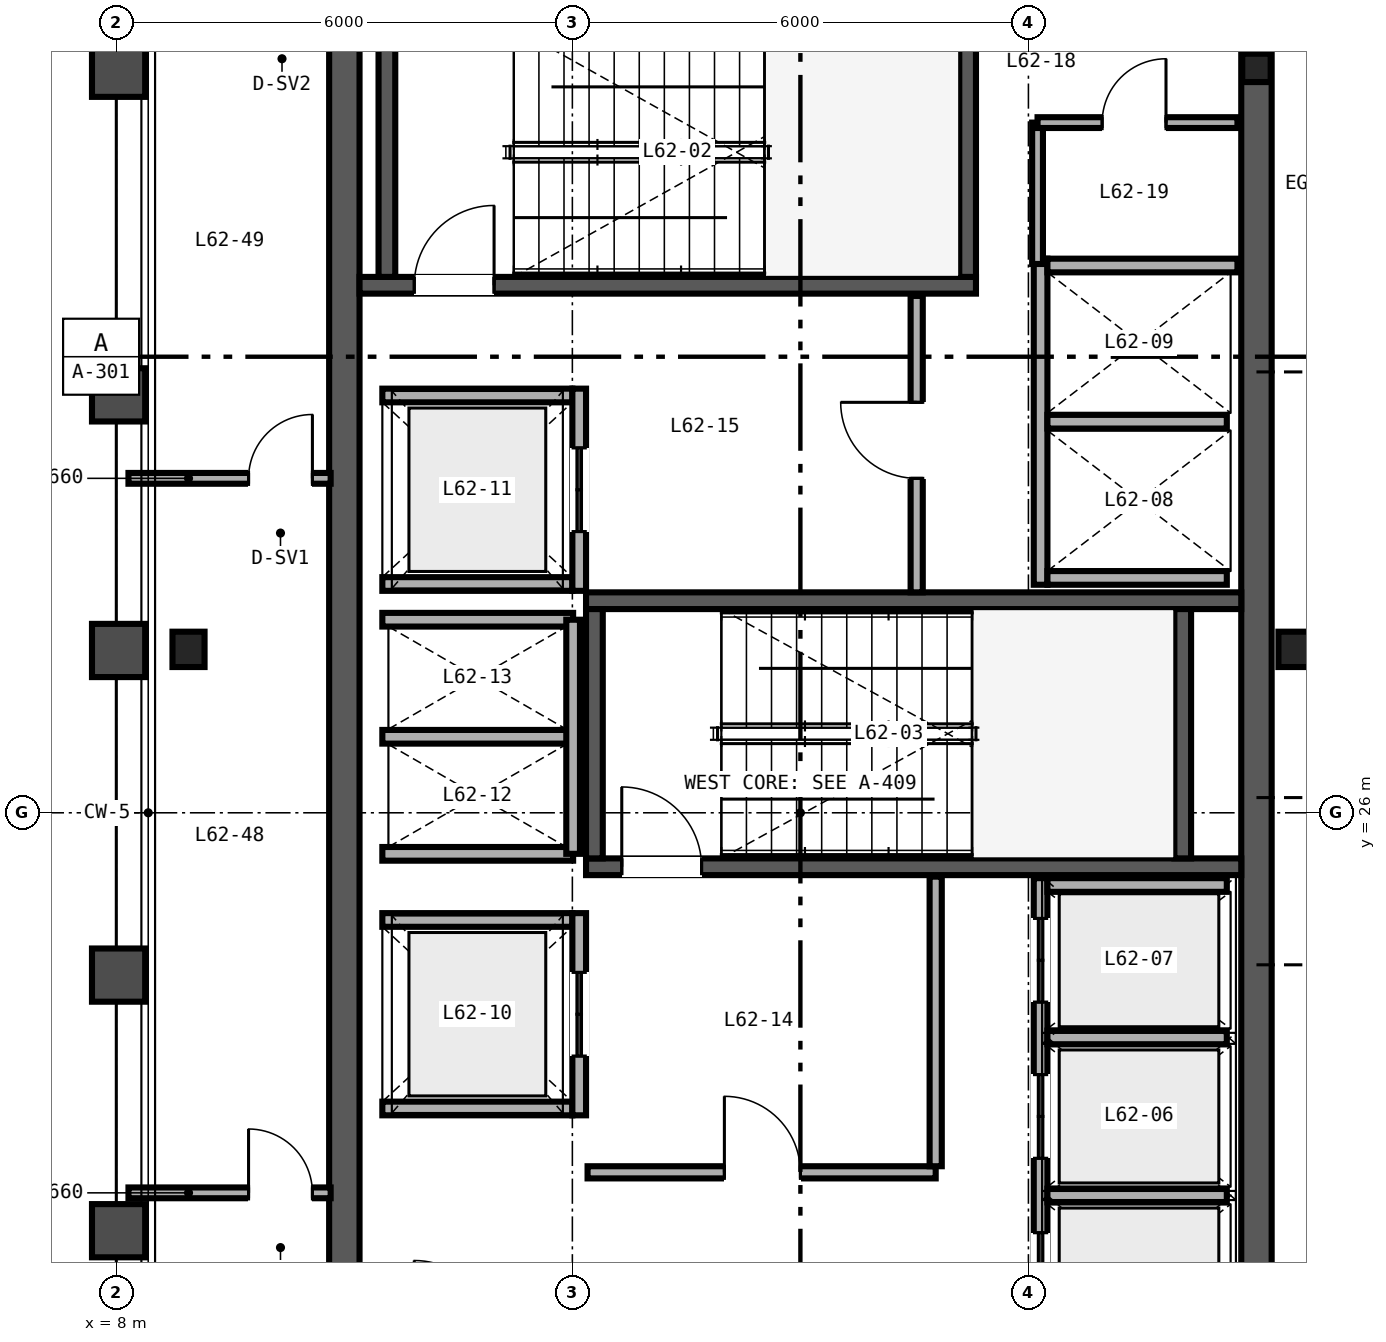
"""IFC4 building model, lengths in metres.
Left out: names, types, materials, properties, quantities, classifications, styles, units other than length and angle.
Written with IfcOpenShell. Run it as: python <this file> out.ifc"""

import sys

from ifc_helpers import new_model, si_unit, direction, frame, frame_2d, origin, origin_2d, place, context, subcontext, project, spatial, rectangle, i_section, extrude, source, transform, mapped, element, fill, save


model = new_model("IFC4")
c1 = context("Model", 3, precision=1e-05, world=origin(), true_north=direction((0.0, 1.0)))
c2 = subcontext(c1, "Body", "Model", "MODEL_VIEW")
j1 = project(units=[si_unit("LENGTHUNIT", "METRE"), si_unit("PLANEANGLEUNIT", "RADIAN")], contexts=[c1])
p1 = place(None, origin())
s1 = spatial("IfcSite", under=j1, at=p1, CompositionType="ELEMENT")
p2 = place(p1, origin())
s2 = spatial("IfcBuilding", under=s1, at=p2, CompositionType="ELEMENT")
p3 = place(p2, frame((0.0, 0.0, 247.2)))
s3 = spatial("IfcBuildingStorey", under=s2, at=p3, CompositionType="ELEMENT", Elevation=247.2)
m1 = source(origin(), c2, "Body", "SweptSolid", [
    extrude(i_section(OverallWidth=0.374, OverallDepth=0.373, WebThickness=0.016, FlangeThickness=0.026, FilletRadius=0.025, at=origin_2d()), origin(), (0.0, 0.0, 1.0), 3.6),
])
p4 = place(p3, frame((23.0, 35.8, 0.0), z_axis=(0.0, 0.0, 1.0), x_axis=(1.0, 0.0, 0.0)))
e1 = element("IfcColumn", 1, at=p4, inside=s3, PredefinedType="COLUMN", context=c2, shape_type="MappedRepresentation", body=[
    mapped(m1, transform((0.0, 0.0, 0.0), scale=1.0)),
])
for number, where, z_axis, x_axis in (
    (2, (11.0, 15.2, 0.0), (0.0, 0.0, 1.0), (0.0, 1.0, 0.0)),
    (3, (23.0, 15.2, 0.0), (0.0, 0.0, 1.0), (0.0, 1.0, 0.0)),
):
    element("IfcWall", number, at=place(p3, frame(where, z_axis=z_axis, x_axis=x_axis)), inside=s3, PredefinedType="SHEAR", context=c2, shape_type="SweptSolid", body=[
        extrude(rectangle(XDim=21.6, YDim=0.4, at=frame_2d((10.8, 0.0))), origin(), (0.0, 0.0, 1.0), 3.38),
    ])
p5 = place(p3, frame((11.2, 32.94, 0.0), z_axis=(0.0, 0.0, 1.0), x_axis=(1.0, 0.0, 0.0)))
e4 = element("IfcWall", 4, at=p5, inside=s3, PredefinedType="SHEAR", context=c2, shape_type="SweptSolid", body=[
    extrude(rectangle(XDim=8.11, YDim=0.22, at=frame_2d((4.055, 0.0))), origin(), (0.0, 0.0, 1.0), 3.4),
])
p6 = place(p5, frame((0.72, 0.0, 0.0)))
e5 = element("IfcOpeningElement", 5, at=p6, cuts=e4, PredefinedType="OPENING", context=c2, shape_type="SweptSolid", body=[
    extrude(rectangle(XDim=1.05, YDim=2.15, at=frame_2d((0.525, 1.075))), frame((0.0, 0.12, 0.0), z_axis=(0.0, -1.0, 0.0), x_axis=(1.0, 0.0, 0.0)), (0.0, 0.0, 1.0), 0.24),
])
for number, where, z_axis, x_axis in (
    (6, (11.56, 33.05, 0.0), (0.0, 0.0, 1.0), (0.0, 1.0, 0.0)),
    (7, (19.2, 33.05, 0.0), (0.0, 0.0, 1.0), (0.0, 1.0, 0.0)),
):
    element("IfcWall", number, at=place(p3, frame(where, z_axis=z_axis, x_axis=x_axis)), inside=s3, PredefinedType="SHEAR", context=c2, shape_type="SweptSolid", body=[
        extrude(rectangle(XDim=3.28, YDim=0.22, at=frame_2d((1.64, 0.0))), origin(), (0.0, 0.0, 1.0), 3.4),
    ])
p7 = place(p3, frame((14.18, 25.29, 0.0), z_axis=(0.0, 0.0, 1.0), x_axis=(1.0, 0.0, 0.0)))
e8 = element("IfcWall", 8, at=p7, inside=s3, PredefinedType="SHEAR", context=c2, shape_type="SweptSolid", body=[
    extrude(rectangle(XDim=8.62, YDim=0.22, at=frame_2d((4.31, 0.0))), origin(), (0.0, 0.0, 1.0), 3.4),
])
p8 = place(p7, frame((0.47, 0.0, 0.0)))
e9 = element("IfcOpeningElement", 9, at=p8, cuts=e8, PredefinedType="OPENING", context=c2, shape_type="SweptSolid", body=[
    extrude(rectangle(XDim=1.05, YDim=2.15, at=frame_2d((0.525, 1.075))), frame((0.0, 0.12, 0.0), z_axis=(0.0, -1.0, 0.0), x_axis=(1.0, 0.0, 0.0)), (0.0, 0.0, 1.0), 0.24),
])
p9 = place(p3, frame((14.18, 28.79, 0.0), z_axis=(0.0, 0.0, 1.0), x_axis=(1.0, 0.0, 0.0)))
e10 = element("IfcWall", 10, at=p9, inside=s3, PredefinedType="SHEAR", context=c2, shape_type="SweptSolid", body=[
    extrude(rectangle(XDim=8.62, YDim=0.22, at=frame_2d((4.31, 0.0))), origin(), (0.0, 0.0, 1.0), 3.4),
])
for number, where, z_axis, x_axis in (
    (11, (14.29, 25.4, 0.0), (0.0, 0.0, 1.0), (0.0, 1.0, 0.0)),
    (12, (22.03, 25.4, 0.0), (0.0, 0.0, 1.0), (0.0, 1.0, 0.0)),
):
    element("IfcWall", number, at=place(p3, frame(where, z_axis=z_axis, x_axis=x_axis)), inside=s3, PredefinedType="SHEAR", context=c2, shape_type="SweptSolid", body=[
        extrude(rectangle(XDim=3.28, YDim=0.22, at=frame_2d((1.64, 0.0))), origin(), (0.0, 0.0, 1.0), 3.4),
    ])
m2 = source(origin(), c2, "Body", "SweptSolid", [
    extrude(i_section(OverallWidth=0.422, OverallDepth=0.465, WebThickness=0.045, FlangeThickness=0.073, FilletRadius=0.025, at=origin_2d()), origin(), (0.0, 0.0, 1.0), 3.38),
])
for number, where, z_axis, x_axis in (
    (13, (8.95, 28.15, 0.0), (0.0, 0.0, 1.0), (1.0, 0.0, 0.0)),
    (14, (23.5, 28.15, 0.0), (0.0, 0.0, 1.0), (1.0, 0.0, 0.0)),
):
    element("IfcColumn", number, at=place(p3, frame(where, z_axis=z_axis, x_axis=x_axis)), inside=s3, PredefinedType="COLUMN", context=c2, shape_type="MappedRepresentation", body=[
        mapped(m2, transform((0.0, 0.0, 0.0), scale=1.0)),
    ])
p10 = place(p3, frame((20.16, 18.82, 0.0), z_axis=(0.0, 0.0, 1.0), x_axis=(0.0, 1.0, 0.0)))
e15 = element("IfcWall", 15, at=p10, inside=s3, PredefinedType="SOLIDWALL", context=c2, shape_type="SweptSolid", body=[
    extrude(rectangle(XDim=6.32, YDim=0.18, at=frame_2d((3.16, 0.0))), origin(), (0.0, 0.0, 1.0), 2.48),
])
p11 = place(p10, frame((0.555, 0.0, 0.0)))
e16 = element("IfcOpeningElement", 16, at=p11, cuts=e15, PredefinedType="OPENING", context=c2, shape_type="SweptSolid", body=[
    extrude(rectangle(XDim=1.1, YDim=2.2, at=frame_2d((0.55, 1.1))), frame((0.0, 0.1, 0.0), z_axis=(0.0, -1.0, 0.0), x_axis=(1.0, 0.0, 0.0)), (0.0, 0.0, 1.0), 0.2),
])
p12 = place(p10, frame((2.635, 0.0, 0.0)))
e17 = element("IfcOpeningElement", 17, at=p12, cuts=e15, PredefinedType="OPENING", context=c2, shape_type="SweptSolid", body=[
    extrude(rectangle(XDim=1.1, YDim=2.2, at=frame_2d((0.55, 1.1))), frame((0.0, 0.1, 0.0), z_axis=(0.0, -1.0, 0.0), x_axis=(1.0, 0.0, 0.0)), (0.0, 0.0, 1.0), 0.2),
])
p13 = place(p10, frame((4.69, 0.0, 0.0)))
e18 = element("IfcOpeningElement", 18, at=p13, cuts=e15, PredefinedType="OPENING", context=c2, shape_type="SweptSolid", body=[
    extrude(rectangle(XDim=1.1, YDim=2.2, at=frame_2d((0.55, 1.1))), frame((0.0, 0.1, 0.0), z_axis=(0.0, -1.0, 0.0), x_axis=(1.0, 0.0, 0.0)), (0.0, 0.0, 1.0), 0.2),
])
p14 = place(p3, frame((20.25, 25.05, 0.0), z_axis=(0.0, 0.0, 1.0), x_axis=(1.0, 0.0, 0.0)))
e19 = element("IfcWall", 19, at=p14, inside=s3, PredefinedType="SOLIDWALL", context=c2, shape_type="SweptSolid", body=[
    extrude(rectangle(XDim=2.36, YDim=0.18, at=frame_2d((1.18, 0.0))), origin(), (0.0, 0.0, 1.0), 3.38),
])
p15 = place(p3, frame((20.25, 20.965, 0.0), z_axis=(0.0, 0.0, 1.0), x_axis=(1.0, 0.0, 0.0)))
e20 = element("IfcWall", 20, at=p15, inside=s3, PredefinedType="SOLIDWALL", context=c2, shape_type="SweptSolid", body=[
    extrude(rectangle(XDim=2.36, YDim=0.18, at=frame_2d((1.18, 0.0))), origin(), (0.0, 0.0, 1.0), 2.48),
])
p16 = place(p3, frame((20.25, 23.045, 0.0), z_axis=(0.0, 0.0, 1.0), x_axis=(1.0, 0.0, 0.0)))
e21 = element("IfcWall", 21, at=p16, inside=s3, PredefinedType="SOLIDWALL", context=c2, shape_type="SweptSolid", body=[
    extrude(rectangle(XDim=2.36, YDim=0.18, at=frame_2d((1.18, 0.0))), origin(), (0.0, 0.0, 1.0), 3.38),
])
p17 = place(p3, frame((20.16, 29.0, 0.0), z_axis=(0.0, 0.0, 1.0), x_axis=(0.0, 1.0, 0.0)))
e22 = element("IfcWall", 22, at=p17, inside=s3, PredefinedType="SOLIDWALL", context=c2, shape_type="SweptSolid", body=[
    extrude(rectangle(XDim=4.29, YDim=0.18, at=frame_2d((2.145, 0.0))), origin(), (0.0, 0.0, 1.0), 3.38),
])
p18 = place(p3, frame((20.25, 29.09, 0.0), z_axis=(0.0, 0.0, 1.0), x_axis=(1.0, 0.0, 0.0)))
e23 = element("IfcWall", 23, at=p18, inside=s3, PredefinedType="SOLIDWALL", context=c2, shape_type="SweptSolid", body=[
    extrude(rectangle(XDim=2.36, YDim=0.18, at=frame_2d((1.18, 0.0))), origin(), (0.0, 0.0, 1.0), 3.38),
])
p19 = place(p3, frame((20.25, 33.2, 0.0), z_axis=(0.0, 0.0, 1.0), x_axis=(1.0, 0.0, 0.0)))
e24 = element("IfcWall", 24, at=p19, inside=s3, PredefinedType="SOLIDWALL", context=c2, shape_type="SweptSolid", body=[
    extrude(rectangle(XDim=2.5, YDim=0.18, at=frame_2d((1.25, 0.0))), origin(), (0.0, 0.0, 1.0), 3.38),
])
p20 = place(p3, frame((20.25, 31.145, 0.0), z_axis=(0.0, 0.0, 1.0), x_axis=(1.0, 0.0, 0.0)))
e25 = element("IfcWall", 25, at=p20, inside=s3, PredefinedType="SOLIDWALL", context=c2, shape_type="SweptSolid", body=[
    extrude(rectangle(XDim=2.36, YDim=0.18, at=frame_2d((1.18, 0.0))), origin(), (0.0, 0.0, 1.0), 3.38),
])
for number, where, z_axis, x_axis in (
    (26, (11.5, 22.11, 0.0), (0.0, 0.0, 1.0), (1.0, 0.0, 0.0)),
    (27, (11.5, 24.59, 0.0), (0.0, 0.0, 1.0), (1.0, 0.0, 0.0)),
):
    element("IfcWall", number, at=place(p3, frame(where, z_axis=z_axis, x_axis=x_axis)), inside=s3, PredefinedType="SOLIDWALL", context=c2, shape_type="SweptSolid", body=[
        extrude(rectangle(XDim=2.5, YDim=0.18, at=frame_2d((1.25, 0.0))), origin(), (0.0, 0.0, 1.0), 3.38),
    ])
p21 = place(p3, frame((14.09, 22.02, 0.0), z_axis=(0.0, 0.0, 1.0), x_axis=(0.0, 1.0, 0.0)))
e28 = element("IfcWall", 28, at=p21, inside=s3, PredefinedType="SOLIDWALL", context=c2, shape_type="SweptSolid", body=[
    extrude(rectangle(XDim=2.66, YDim=0.18, at=frame_2d((1.33, 0.0))), origin(), (0.0, 0.0, 1.0), 3.38),
])
p22 = place(p21, frame((0.78, 0.0, 0.0)))
e29 = element("IfcOpeningElement", 29, at=p22, cuts=e28, PredefinedType="OPENING", context=c2, shape_type="SweptSolid", body=[
    extrude(rectangle(XDim=1.1, YDim=2.2, at=frame_2d((0.55, 1.1))), frame((0.0, 0.1, 0.0), z_axis=(0.0, -1.0, 0.0), x_axis=(1.0, 0.0, 0.0)), (0.0, 0.0, 1.0), 0.2),
])
for number, where, z_axis, x_axis in (
    (30, (11.5, 29.01, 0.0), (0.0, 0.0, 1.0), (1.0, 0.0, 0.0)),
    (31, (11.5, 31.49, 0.0), (0.0, 0.0, 1.0), (1.0, 0.0, 0.0)),
):
    element("IfcWall", number, at=place(p3, frame(where, z_axis=z_axis, x_axis=x_axis)), inside=s3, PredefinedType="SOLIDWALL", context=c2, shape_type="SweptSolid", body=[
        extrude(rectangle(XDim=2.5, YDim=0.18, at=frame_2d((1.25, 0.0))), origin(), (0.0, 0.0, 1.0), 3.38),
    ])
p23 = place(p3, frame((14.09, 28.92, 0.0), z_axis=(0.0, 0.0, 1.0), x_axis=(0.0, 1.0, 0.0)))
e32 = element("IfcWall", 32, at=p23, inside=s3, PredefinedType="SOLIDWALL", context=c2, shape_type="SweptSolid", body=[
    extrude(rectangle(XDim=2.66, YDim=0.18, at=frame_2d((1.33, 0.0))), origin(), (0.0, 0.0, 1.0), 3.38),
])
p24 = place(p23, frame((0.78, 0.0, 0.0)))
e33 = element("IfcOpeningElement", 33, at=p24, cuts=e32, PredefinedType="OPENING", context=c2, shape_type="SweptSolid", body=[
    extrude(rectangle(XDim=1.1, YDim=2.2, at=frame_2d((0.55, 1.1))), frame((0.0, 0.1, 0.0), z_axis=(0.0, -1.0, 0.0), x_axis=(1.0, 0.0, 0.0)), (0.0, 0.0, 1.0), 0.2),
])
for number, where, z_axis, x_axis in (
    (34, (11.5, 25.46, 0.0), (0.0, 0.0, 1.0), (1.0, 0.0, 0.0)),
    (35, (11.5, 27.0, 0.0), (0.0, 0.0, 1.0), (1.0, 0.0, 0.0)),
    (36, (11.5, 28.54, 0.0), (0.0, 0.0, 1.0), (1.0, 0.0, 0.0)),
):
    element("IfcWall", number, at=place(p3, frame(where, z_axis=z_axis, x_axis=x_axis)), inside=s3, PredefinedType="SOLIDWALL", context=c2, shape_type="SweptSolid", body=[
        extrude(rectangle(XDim=2.51, YDim=0.18, at=frame_2d((1.255, 0.0))), origin(), (0.0, 0.0, 1.0), 3.38),
    ])
p25 = place(p3, frame((14.01, 25.46, 0.0), z_axis=(0.0, 0.0, 1.0), x_axis=(0.0, 1.0, 0.0)))
e37 = element("IfcWall", 37, at=p25, inside=s3, PredefinedType="SOLIDWALL", context=c2, shape_type="SweptSolid", body=[
    extrude(rectangle(XDim=3.08, YDim=0.18, at=frame_2d((1.54, 0.0))), origin(), (0.0, 0.0, 1.0), 3.38),
])
p26 = place(p3, frame((14.2, 21.27, 0.0), z_axis=(0.0, 0.0, 1.0), x_axis=(1.0, 0.0, 0.0)))
e38 = element("IfcWall", 38, at=p26, inside=s3, PredefinedType="PARTITIONING", context=c2, shape_type="SweptSolid", body=[
    extrude(rectangle(XDim=4.58, YDim=0.16, at=frame_2d((2.29, 0.0))), origin(), (0.0, 0.0, 1.0), 3.38),
])
p27 = place(p26, frame((1.8, 0.0, 0.0)))
e39 = element("IfcOpeningElement", 39, at=p27, cuts=e38, PredefinedType="OPENING", context=c2, shape_type="SweptSolid", body=[
    extrude(rectangle(XDim=1.0, YDim=2.15, at=frame_2d((0.5, 1.075))), frame((0.0, 0.09, 0.0), z_axis=(0.0, -1.0, 0.0), x_axis=(1.0, 0.0, 0.0)), (0.0, 0.0, 1.0), 0.18),
])
p28 = place(p3, frame((18.78, 21.35, 0.0), z_axis=(0.0, 0.0, 1.0), x_axis=(0.0, 1.0, 0.0)))
e40 = element("IfcWall", 40, at=p28, inside=s3, PredefinedType="PARTITIONING", context=c2, shape_type="SweptSolid", body=[
    extrude(rectangle(XDim=3.81, YDim=0.16, at=frame_2d((1.905, 0.0))), origin(), (0.0, 0.0, 1.0), 3.38),
])
p29 = place(p3, frame((18.53, 28.9, 0.0), z_axis=(0.0, 0.0, 1.0), x_axis=(0.0, 1.0, 0.0)))
e41 = element("IfcWall", 41, at=p29, inside=s3, PredefinedType="PARTITIONING", context=c2, shape_type="SweptSolid", body=[
    extrude(rectangle(XDim=3.9, YDim=0.16, at=frame_2d((1.95, 0.0))), origin(), (0.0, 0.0, 1.0), 3.38),
])
p30 = place(p29, frame((1.5, 0.0, 0.0)))
e42 = element("IfcOpeningElement", 42, at=p30, cuts=e41, PredefinedType="OPENING", context=c2, shape_type="SweptSolid", body=[
    extrude(rectangle(XDim=1.0, YDim=2.15, at=frame_2d((0.5, 1.075))), frame((0.0, 0.09, 0.0), z_axis=(0.0, -1.0, 0.0), x_axis=(1.0, 0.0, 0.0)), (0.0, 0.0, 1.0), 0.18),
])
p31 = place(p3, frame((20.12, 33.22, 0.0), z_axis=(0.0, 0.0, 1.0), x_axis=(0.0, 1.0, 0.0)))
e43 = element("IfcWall", 43, at=p31, inside=s3, PredefinedType="PARTITIONING", context=c2, shape_type="SweptSolid", body=[
    extrude(rectangle(XDim=1.86, YDim=0.142, at=frame_2d((0.93, 0.0))), origin(), (0.0, 0.0, 1.0), 3.38),
])
p32 = place(p3, frame((20.12, 35.08, 0.0), z_axis=(0.0, 0.0, 1.0), x_axis=(1.0, 0.0, 0.0)))
e44 = element("IfcWall", 44, at=p32, inside=s3, PredefinedType="PARTITIONING", context=c2, shape_type="SweptSolid", body=[
    extrude(rectangle(XDim=2.63, YDim=0.142, at=frame_2d((1.315, 0.0))), origin(), (0.0, 0.0, 1.0), 3.38),
])
p33 = place(p32, frame((0.85, 0.0, 0.0)))
e45 = element("IfcOpeningElement", 45, at=p33, cuts=e44, PredefinedType="OPENING", context=c2, shape_type="SweptSolid", body=[
    extrude(rectangle(XDim=0.84, YDim=2.1, at=frame_2d((0.42, 1.05))), frame((0.0, 0.081, 0.0), z_axis=(0.0, -1.0, 0.0), x_axis=(1.0, 0.0, 0.0)), (0.0, 0.0, 1.0), 0.162),
])
p34 = place(p3, frame((8.16, 21.0, 0.0), z_axis=(0.0, 0.0, 1.0), x_axis=(1.0, 0.0, 0.0)))
e46 = element("IfcWall", 46, at=p34, inside=s3, PredefinedType="PARTITIONING", context=c2, shape_type="SweptSolid", body=[
    extrude(rectangle(XDim=2.66, YDim=0.142, at=frame_2d((1.33, 0.0))), origin(), (0.0, 0.0, 1.0), 2.48),
])
p35 = place(p34, frame((1.58, 0.0, 0.0)))
e47 = element("IfcOpeningElement", 47, at=p35, cuts=e46, PredefinedType="OPENING", context=c2, shape_type="SweptSolid", body=[
    extrude(rectangle(XDim=0.84, YDim=2.1, at=frame_2d((0.42, 1.05))), frame((0.0, 0.081, 0.0), z_axis=(0.0, -1.0, 0.0), x_axis=(1.0, 0.0, 0.0)), (0.0, 0.0, 1.0), 0.162),
])
p36 = place(p3, frame((8.16, 30.4, 0.0), z_axis=(0.0, 0.0, 1.0), x_axis=(1.0, 0.0, 0.0)))
e48 = element("IfcWall", 48, at=p36, inside=s3, PredefinedType="PARTITIONING", context=c2, shape_type="SweptSolid", body=[
    extrude(rectangle(XDim=2.66, YDim=0.142, at=frame_2d((1.33, 0.0))), origin(), (0.0, 0.0, 1.0), 2.763),
])
p37 = place(p36, frame((1.58, 0.0, 0.0)))
e49 = element("IfcOpeningElement", 49, at=p37, cuts=e48, PredefinedType="OPENING", context=c2, shape_type="SweptSolid", body=[
    extrude(rectangle(XDim=0.84, YDim=2.1, at=frame_2d((0.42, 1.05))), frame((0.0, 0.081, 0.0), z_axis=(0.0, -1.0, 0.0), x_axis=(1.0, 0.0, 0.0)), (0.0, 0.0, 1.0), 0.162),
])
m3 = source(origin(), c2, "Body", "SweptSolid", [
    extrude(rectangle(XDim=1.05, YDim=2.15, at=frame_2d((0.525, 1.075))), frame((0.0, 0.025, 0.0), z_axis=(0.0, -1.0, 0.0), x_axis=(1.0, 0.0, 0.0)), (0.0, 0.0, 1.0), 0.05),
])
p38 = place(p6, origin())
e50 = element("IfcDoor", 50, at=p38, inside=s3, OperationType="SINGLE_SWING_RIGHT", PredefinedType="DOOR", context=c2, shape_type="MappedRepresentation", body=[
    mapped(m3, transform((0.0, 0.0, 0.0), scale=1.0)),
])
fill(e5, e50)
p39 = place(p8, origin())
e51 = element("IfcDoor", 51, at=p39, inside=s3, OperationType="SINGLE_SWING_LEFT", PredefinedType="DOOR", context=c2, shape_type="MappedRepresentation", body=[
    mapped(m3, transform((0.0, 0.0, 0.0), scale=1.0)),
])
fill(e9, e51)
m4 = source(origin(), c2, "Body", "SweptSolid", [
    extrude(rectangle(XDim=1.1, YDim=2.2, at=frame_2d((0.55, 1.1))), frame((0.0, 0.025, 0.0), z_axis=(0.0, -1.0, 0.0), x_axis=(1.0, 0.0, 0.0)), (0.0, 0.0, 1.0), 0.05),
])
p40 = place(p11, origin())
e52 = element("IfcDoor", 52, at=p40, inside=s3, OperationType="DOUBLE_DOOR_SLIDING", PredefinedType="DOOR", context=c2, shape_type="MappedRepresentation", body=[
    mapped(m4, transform((0.0, 0.0, 0.0), scale=1.0)),
])
fill(e16, e52)
p41 = place(p12, origin())
e53 = element("IfcDoor", 53, at=p41, inside=s3, OperationType="DOUBLE_DOOR_SLIDING", PredefinedType="DOOR", context=c2, shape_type="MappedRepresentation", body=[
    mapped(m4, transform((0.0, 0.0, 0.0), scale=1.0)),
])
fill(e17, e53)
p42 = place(p13, origin())
e54 = element("IfcDoor", 54, at=p42, inside=s3, OperationType="DOUBLE_DOOR_SLIDING", PredefinedType="DOOR", context=c2, shape_type="MappedRepresentation", body=[
    mapped(m4, transform((0.0, 0.0, 0.0), scale=1.0)),
])
fill(e18, e54)
p43 = place(p22, origin())
e55 = element("IfcDoor", 55, at=p43, inside=s3, OperationType="DOUBLE_DOOR_SLIDING", PredefinedType="DOOR", context=c2, shape_type="MappedRepresentation", body=[
    mapped(m4, transform((0.0, 0.0, 0.0), scale=1.0)),
])
fill(e29, e55)
p44 = place(p24, origin())
e56 = element("IfcDoor", 56, at=p44, inside=s3, OperationType="DOUBLE_DOOR_SLIDING", PredefinedType="DOOR", context=c2, shape_type="MappedRepresentation", body=[
    mapped(m4, transform((0.0, 0.0, 0.0), scale=1.0)),
])
fill(e33, e56)
m5 = source(origin(), c2, "Body", "SweptSolid", [
    extrude(rectangle(XDim=1.0, YDim=2.15, at=frame_2d((0.5, 1.075))), frame((0.0, 0.025, 0.0), z_axis=(0.0, -1.0, 0.0), x_axis=(1.0, 0.0, 0.0)), (0.0, 0.0, 1.0), 0.05),
])
p45 = place(p27, origin())
e57 = element("IfcDoor", 57, at=p45, inside=s3, OperationType="SINGLE_SWING_LEFT", PredefinedType="DOOR", context=c2, shape_type="MappedRepresentation", body=[
    mapped(m5, transform((0.0, 0.0, 0.0), scale=1.0)),
])
fill(e39, e57)
p46 = place(p30, origin())
e58 = element("IfcDoor", 58, at=p46, inside=s3, OperationType="SINGLE_SWING_RIGHT", PredefinedType="DOOR", context=c2, shape_type="MappedRepresentation", body=[
    mapped(m5, transform((0.0, 0.0, 0.0), scale=1.0)),
])
fill(e42, e58)
m6 = source(origin(), c2, "Body", "SweptSolid", [
    extrude(rectangle(XDim=0.84, YDim=2.1, at=frame_2d((0.42, 1.05))), frame((0.0, 0.025, 0.0), z_axis=(0.0, -1.0, 0.0), x_axis=(1.0, 0.0, 0.0)), (0.0, 0.0, 1.0), 0.05),
])
p47 = place(p33, origin())
e59 = element("IfcDoor", 59, at=p47, inside=s3, OperationType="SINGLE_SWING_RIGHT", PredefinedType="DOOR", context=c2, shape_type="MappedRepresentation", body=[
    mapped(m6, transform((0.0, 0.0, 0.0), scale=1.0)),
])
fill(e45, e59)
p48 = place(p35, origin())
e60 = element("IfcDoor", 60, at=p48, inside=s3, OperationType="SINGLE_SWING_LEFT", PredefinedType="DOOR", context=c2, shape_type="MappedRepresentation", body=[
    mapped(m6, transform((0.0, 0.0, 0.0), scale=1.0)),
])
fill(e47, e60)
p49 = place(p37, origin())
e61 = element("IfcDoor", 61, at=p49, inside=s3, OperationType="SINGLE_SWING_RIGHT", PredefinedType="DOOR", context=c2, shape_type="MappedRepresentation", body=[
    mapped(m6, transform((0.0, 0.0, 0.0), scale=1.0)),
])
fill(e49, e61)
save(model, sys.argv[1])
